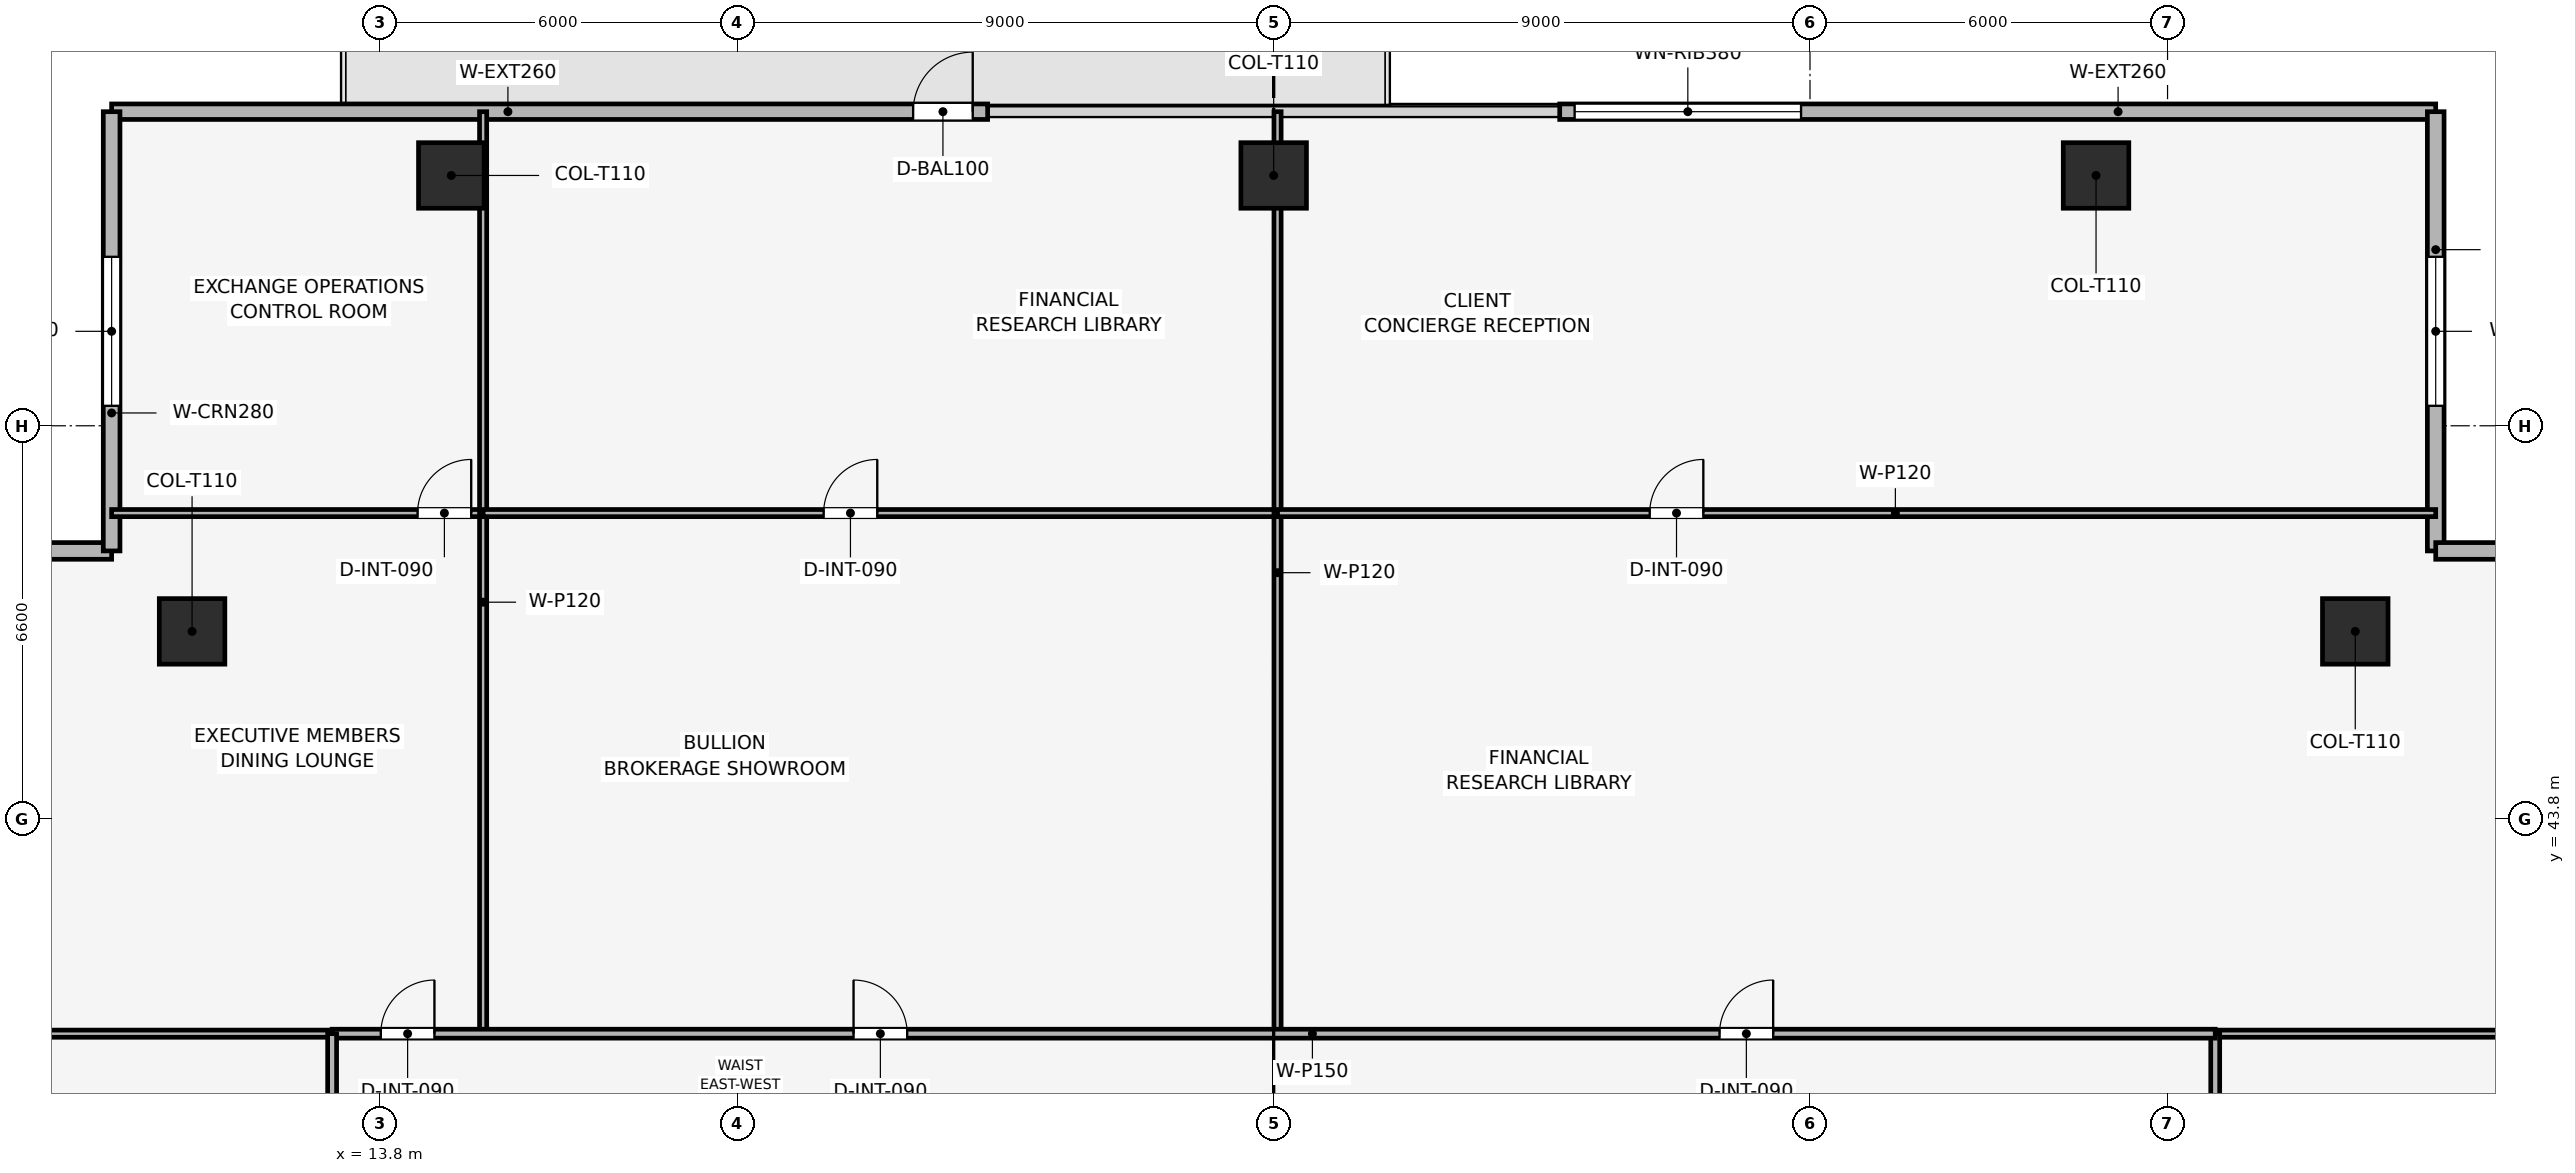
"""IFC4 building model, lengths in metres.
Left out: names, types, materials, properties, quantities, classifications, styles, units other than length and angle.
Written with IfcOpenShell. Run it as: python <this file> out.ifc"""

import sys

from ifc_helpers import new_model, si_unit, direction, frame, frame_2d, origin, origin_2d, place, context, subcontext, project, spatial, rectangle, extrude, element, fill, save


model = new_model("IFC4")
c1 = context("Model", 3, precision=1e-05, world=origin(), true_north=direction((0.0, 1.0)))
c2 = subcontext(c1, "Body", "Model", "MODEL_VIEW")
j1 = project(units=[si_unit("LENGTHUNIT", "METRE"), si_unit("PLANEANGLEUNIT", "RADIAN")], contexts=[c1])
p1 = place(None, origin())
s1 = spatial("IfcSite", under=j1, at=p1, CompositionType="ELEMENT")
p2 = place(p1, origin())
s2 = spatial("IfcBuilding", under=s1, at=p2, CompositionType="ELEMENT")
p3 = place(p2, frame((0.0, 0.0, 226.2)))
s3 = spatial("IfcBuildingStorey", under=s2, at=p3, CompositionType="ELEMENT", Elevation=226.2)
for number, where, z_axis, x_axis in (
    (1, (42.6, 54.6, 0.003), (0.0, 0.0, 1.0), (1.0, 0.0, 0.0)),
    (2, (28.8, 54.6, 0.003), (0.0, 0.0, 1.0), (1.0, 0.0, 0.0)),
    (3, (15.0, 54.6, 0.003), (0.0, 0.0, 1.0), (1.0, 0.0, 0.0)),
    (4, (46.95, 46.95, 0.003), (0.0, 0.0, 1.0), (1.0, 0.0, 0.0)),
    (5, (10.65, 46.95, 0.003), (0.0, 0.0, 1.0), (1.0, 0.0, 0.0)),
):
    element("IfcColumn", number, at=place(p3, frame(where, z_axis=z_axis, x_axis=x_axis)), inside=s3, PredefinedType="COLUMN", context=c2, shape_type="SweptSolid", body=[
        extrude(rectangle(XDim=1.1, YDim=1.1, at=origin_2d()), origin(), (0.0, 0.0, 1.0), 3.494),
    ])
p4 = place(p3, frame((9.3, 55.67, 0.0), z_axis=(0.0, 0.0, 1.0), x_axis=(1.0, 0.0, 0.0)))
e6 = element("IfcWall", 6, at=p4, inside=s3, PredefinedType="SOLIDWALL", context=c2, shape_type="SweptSolid", body=[
    extrude(rectangle(XDim=14.7, YDim=0.26, at=frame_2d((7.35, 0.0))), origin(), (0.0, 0.0, 1.0), 3.5),
])
p5 = place(p4, frame((13.45, 0.0, 0.0)))
e7 = element("IfcOpeningElement", 7, at=p5, cuts=e6, PredefinedType="OPENING", context=c2, shape_type="SweptSolid", body=[
    extrude(rectangle(XDim=1.0, YDim=2.2, at=frame_2d((0.5, 1.1))), frame((0.0, 0.14, 0.0), z_axis=(0.0, -1.0, 0.0), x_axis=(1.0, 0.0, 0.0)), (0.0, 0.0, 1.0), 0.28),
])
p6 = place(p3, frame((33.6, 55.67, 0.0), z_axis=(0.0, 0.0, 1.0), x_axis=(1.0, 0.0, 0.0)))
e8 = element("IfcWall", 8, at=p6, inside=s3, PredefinedType="SOLIDWALL", context=c2, shape_type="SweptSolid", body=[
    extrude(rectangle(XDim=14.7, YDim=0.26, at=frame_2d((7.35, 0.0))), origin(), (0.0, 0.0, 1.0), 3.5),
])
p7 = place(p6, frame((0.25, 0.0, 0.9)))
e9 = element("IfcOpeningElement", 9, at=p7, cuts=e8, PredefinedType="OPENING", context=c2, shape_type="SweptSolid", body=[
    extrude(rectangle(XDim=3.8, YDim=1.9, at=frame_2d((1.9, 0.95))), frame((0.0, 0.14, 0.0), z_axis=(0.0, -1.0, 0.0), x_axis=(1.0, 0.0, 0.0)), (0.0, 0.0, 1.0), 0.28),
])
p8 = place(p3, frame((1.93, 48.3, 0.0), z_axis=(0.0, 0.0, 1.0), x_axis=(1.0, 0.0, 0.0)))
e10 = element("IfcWall", 10, at=p8, inside=s3, PredefinedType="SOLIDWALL", context=c2, shape_type="SweptSolid", body=[
    extrude(rectangle(XDim=7.37, YDim=0.28, at=frame_2d((3.685, 0.0))), origin(), (0.0, 0.0, 1.0), 3.5),
])
p9 = place(p8, frame((2.435, 0.0, 0.9)))
e11 = element("IfcOpeningElement", 11, at=p9, cuts=e10, PredefinedType="OPENING", context=c2, shape_type="SweptSolid", body=[
    extrude(rectangle(XDim=2.5, YDim=1.9, at=frame_2d((1.25, 0.95))), frame((0.0, 0.15, 0.0), z_axis=(0.0, -1.0, 0.0), x_axis=(1.0, 0.0, 0.0)), (0.0, 0.0, 1.0), 0.3),
])
p10 = place(p3, frame((9.3, 48.3, 0.0), z_axis=(0.0, 0.0, 1.0), x_axis=(0.0, 1.0, 0.0)))
e12 = element("IfcWall", 12, at=p10, inside=s3, PredefinedType="SOLIDWALL", context=c2, shape_type="SweptSolid", body=[
    extrude(rectangle(XDim=7.37, YDim=0.28, at=frame_2d((3.685, 0.0))), origin(), (0.0, 0.0, 1.0), 3.5),
])
p11 = place(p10, frame((2.435, 0.0, 0.9)))
e13 = element("IfcOpeningElement", 13, at=p11, cuts=e12, PredefinedType="OPENING", context=c2, shape_type="SweptSolid", body=[
    extrude(rectangle(XDim=2.5, YDim=1.9, at=frame_2d((1.25, 0.95))), frame((0.0, 0.15, 0.0), z_axis=(0.0, -1.0, 0.0), x_axis=(1.0, 0.0, 0.0)), (0.0, 0.0, 1.0), 0.3),
])
p12 = place(p3, frame((48.3, 55.67, 0.0), z_axis=(0.0, 0.0, 1.0), x_axis=(0.0, -1.0, 0.0)))
e14 = element("IfcWall", 14, at=p12, inside=s3, PredefinedType="SOLIDWALL", context=c2, shape_type="SweptSolid", body=[
    extrude(rectangle(XDim=7.37, YDim=0.28, at=frame_2d((3.685, 0.0))), origin(), (0.0, 0.0, 1.0), 3.5),
])
p13 = place(p12, frame((2.435, 0.0, 0.9)))
e15 = element("IfcOpeningElement", 15, at=p13, cuts=e14, PredefinedType="OPENING", context=c2, shape_type="SweptSolid", body=[
    extrude(rectangle(XDim=2.5, YDim=1.9, at=frame_2d((1.25, 0.95))), frame((0.0, 0.15, 0.0), z_axis=(0.0, -1.0, 0.0), x_axis=(1.0, 0.0, 0.0)), (0.0, 0.0, 1.0), 0.3),
])
p14 = place(p3, frame((48.3, 48.3, 0.0), z_axis=(0.0, 0.0, 1.0), x_axis=(1.0, 0.0, 0.0)))
e16 = element("IfcWall", 16, at=p14, inside=s3, PredefinedType="SOLIDWALL", context=c2, shape_type="SweptSolid", body=[
    extrude(rectangle(XDim=7.37, YDim=0.28, at=frame_2d((3.685, 0.0))), origin(), (0.0, 0.0, 1.0), 3.5),
])
p15 = place(p14, frame((2.435, 0.0, 0.9)))
e17 = element("IfcOpeningElement", 17, at=p15, cuts=e16, PredefinedType="OPENING", context=c2, shape_type="SweptSolid", body=[
    extrude(rectangle(XDim=2.5, YDim=1.9, at=frame_2d((1.25, 0.95))), frame((0.0, 0.15, 0.0), z_axis=(0.0, -1.0, 0.0), x_axis=(1.0, 0.0, 0.0)), (0.0, 0.0, 1.0), 0.3),
])
p16 = place(p3, frame((9.3, 48.935, 0.0), z_axis=(0.0, 0.0, 1.0), x_axis=(1.0, 0.0, 0.0)))
e18 = element("IfcWall", 18, at=p16, inside=s3, PredefinedType="PARTITIONING", context=c2, shape_type="SweptSolid", body=[
    extrude(rectangle(XDim=6.234, YDim=0.12, at=frame_2d((3.117, 0.0))), origin(), (0.0, 0.0, 1.0), 2.885),
])
p17 = place(p16, frame((5.134, 0.0, 0.0)))
e19 = element("IfcOpeningElement", 19, at=p17, cuts=e18, PredefinedType="OPENING", context=c2, shape_type="SweptSolid", body=[
    extrude(rectangle(XDim=0.9, YDim=2.1, at=frame_2d((0.45, 1.05))), frame((0.0, 0.07, 0.0), z_axis=(0.0, -1.0, 0.0), x_axis=(1.0, 0.0, 0.0)), (0.0, 0.0, 1.0), 0.14),
])
p18 = place(p3, frame((15.534, 40.2, 0.0), z_axis=(0.0, 0.0, 1.0), x_axis=(0.0, 1.0, 0.0)))
e20 = element("IfcWall", 20, at=p18, inside=s3, PredefinedType="PARTITIONING", context=c2, shape_type="SweptSolid", body=[
    extrude(rectangle(XDim=15.47, YDim=0.12, at=frame_2d((7.735, 0.0))), origin(), (0.0, 0.0, 1.0), 2.885),
])
p19 = place(p3, frame((15.534, 48.935, 0.0), z_axis=(0.0, 0.0, 1.0), x_axis=(1.0, 0.0, 0.0)))
e21 = element("IfcWall", 21, at=p19, inside=s3, PredefinedType="PARTITIONING", context=c2, shape_type="SweptSolid", body=[
    extrude(rectangle(XDim=13.331, YDim=0.12, at=frame_2d((6.666, 0.0))), origin(), (0.0, 0.0, 1.0), 3.035),
])
p20 = place(p19, frame((5.714, 0.0, 0.0)))
e22 = element("IfcOpeningElement", 22, at=p20, cuts=e21, PredefinedType="OPENING", context=c2, shape_type="SweptSolid", body=[
    extrude(rectangle(XDim=0.9, YDim=2.1, at=frame_2d((0.45, 1.05))), frame((0.0, 0.07, 0.0), z_axis=(0.0, -1.0, 0.0), x_axis=(1.0, 0.0, 0.0)), (0.0, 0.0, 1.0), 0.14),
])
p21 = place(p3, frame((28.865, 40.2, 0.0), z_axis=(0.0, 0.0, 1.0), x_axis=(0.0, 1.0, 0.0)))
e23 = element("IfcWall", 23, at=p21, inside=s3, PredefinedType="PARTITIONING", context=c2, shape_type="SweptSolid", body=[
    extrude(rectangle(XDim=15.47, YDim=0.12, at=frame_2d((7.735, 0.0))), origin(), (0.0, 0.0, 1.0), 2.985),
])
p22 = place(p3, frame((28.865, 48.935, 0.0), z_axis=(0.0, 0.0, 1.0), x_axis=(1.0, 0.0, 0.0)))
e24 = element("IfcWall", 24, at=p22, inside=s3, PredefinedType="PARTITIONING", context=c2, shape_type="SweptSolid", body=[
    extrude(rectangle(XDim=19.435, YDim=0.12, at=frame_2d((9.718, 0.0))), origin(), (0.0, 0.0, 1.0), 2.885),
])
p23 = place(p22, frame((6.245, 0.0, 0.0)))
e25 = element("IfcOpeningElement", 25, at=p23, cuts=e24, PredefinedType="OPENING", context=c2, shape_type="SweptSolid", body=[
    extrude(rectangle(XDim=0.9, YDim=2.1, at=frame_2d((0.45, 1.05))), frame((0.0, 0.07, 0.0), z_axis=(0.0, -1.0, 0.0), x_axis=(1.0, 0.0, 0.0)), (0.0, 0.0, 1.0), 0.14),
])
p24 = place(p3, frame((1.93, 40.2, 0.0), z_axis=(0.0, 0.0, 1.0), x_axis=(1.0, 0.0, 0.0)))
e26 = element("IfcWall", 26, at=p24, inside=s3, PredefinedType="PARTITIONING", context=c2, shape_type="SweptSolid", body=[
    extrude(rectangle(XDim=11.07, YDim=0.12, at=frame_2d((5.535, 0.0))), origin(), (0.0, 0.0, 1.0), 2.885),
])
p25 = place(p3, frame((44.6, 40.2, 0.0), z_axis=(0.0, 0.0, 1.0), x_axis=(1.0, 0.0, 0.0)))
e27 = element("IfcWall", 27, at=p25, inside=s3, PredefinedType="PARTITIONING", context=c2, shape_type="SweptSolid", body=[
    extrude(rectangle(XDim=11.07, YDim=0.12, at=frame_2d((5.535, 0.0))), origin(), (0.0, 0.0, 1.0), 2.885),
])
p26 = place(p3, frame((44.6, 37.8, 0.0), z_axis=(0.0, 0.0, 1.0), x_axis=(0.0, 1.0, 0.0)))
e28 = element("IfcWall", 28, at=p26, inside=s3, PredefinedType="PARTITIONING", context=c2, shape_type="SweptSolid", body=[
    extrude(rectangle(XDim=2.4, YDim=0.15, at=frame_2d((1.2, 0.0))), origin(), (0.0, 0.0, 1.0), 3.5),
])
p27 = place(p3, frame((13.0, 40.2, 0.0), z_axis=(0.0, 0.0, 1.0), x_axis=(1.0, 0.0, 0.0)))
e29 = element("IfcWall", 29, at=p27, inside=s3, PredefinedType="PARTITIONING", context=c2, shape_type="SweptSolid", body=[
    extrude(rectangle(XDim=31.6, YDim=0.15, at=frame_2d((15.8, 0.0))), origin(), (0.0, 0.0, 1.0), 3.035),
])
p28 = place(p27, frame((0.817, 0.0, 0.0)))
e30 = element("IfcOpeningElement", 30, at=p28, cuts=e29, PredefinedType="OPENING", context=c2, shape_type="SweptSolid", body=[
    extrude(rectangle(XDim=0.9, YDim=2.1, at=frame_2d((0.45, 1.05))), frame((0.0, 0.085, 0.0), z_axis=(0.0, -1.0, 0.0), x_axis=(1.0, 0.0, 0.0)), (0.0, 0.0, 1.0), 0.17),
])
p29 = place(p27, frame((8.75, 0.0, 0.0)))
e31 = element("IfcOpeningElement", 31, at=p29, cuts=e29, PredefinedType="OPENING", context=c2, shape_type="SweptSolid", body=[
    extrude(rectangle(XDim=0.9, YDim=2.1, at=frame_2d((0.45, 1.05))), frame((0.0, 0.085, 0.0), z_axis=(0.0, -1.0, 0.0), x_axis=(1.0, 0.0, 0.0)), (0.0, 0.0, 1.0), 0.17),
])
p30 = place(p27, frame((23.282, 0.0, 0.0)))
e32 = element("IfcOpeningElement", 32, at=p30, cuts=e29, PredefinedType="OPENING", context=c2, shape_type="SweptSolid", body=[
    extrude(rectangle(XDim=0.9, YDim=2.1, at=frame_2d((0.45, 1.05))), frame((0.0, 0.085, 0.0), z_axis=(0.0, -1.0, 0.0), x_axis=(1.0, 0.0, 0.0)), (0.0, 0.0, 1.0), 0.17),
])
p31 = place(p3, frame((13.0, 17.4, 0.0), z_axis=(0.0, 0.0, 1.0), x_axis=(0.0, 1.0, 0.0)))
e33 = element("IfcWall", 33, at=p31, inside=s3, PredefinedType="PARTITIONING", context=c2, shape_type="SweptSolid", body=[
    extrude(rectangle(XDim=22.8, YDim=0.15, at=frame_2d((11.4, 0.0))), origin(), (0.0, 0.0, 1.0), 3.035),
])
p32 = place(p31, frame((10.95, 0.0, 0.0)))
e34 = element("IfcOpeningElement", 34, at=p32, cuts=e33, PredefinedType="OPENING", context=c2, shape_type="SweptSolid", body=[
    extrude(rectangle(XDim=0.9, YDim=2.1, at=frame_2d((0.45, 1.05))), frame((0.0, 0.085, 0.0), z_axis=(0.0, -1.0, 0.0), x_axis=(1.0, 0.0, 0.0)), (0.0, 0.0, 1.0), 0.17),
])
p33 = place(p5, origin())
e35 = element("IfcDoor", 35, at=p33, inside=s3, OperationType="SINGLE_SWING_RIGHT", PredefinedType="DOOR", context=c2, shape_type="SweptSolid", body=[
    extrude(rectangle(XDim=1.0, YDim=2.2, at=frame_2d((0.5, 1.1))), frame((0.0, 0.025, 0.0), z_axis=(0.0, -1.0, 0.0), x_axis=(1.0, 0.0, 0.0)), (0.0, 0.0, 1.0), 0.05),
])
fill(e7, e35)
p34 = place(p7, origin())
e36 = element("IfcWindow", 36, at=p34, inside=s3, PartitioningType="SINGLE_PANEL", PredefinedType="WINDOW", context=c2, shape_type="SweptSolid", body=[
    extrude(rectangle(XDim=3.8, YDim=1.9, at=frame_2d((1.9, 0.95))), frame((0.0, 0.03, 0.0), z_axis=(0.0, -1.0, 0.0), x_axis=(1.0, 0.0, 0.0)), (0.0, 0.0, 1.0), 0.06),
])
fill(e9, e36)
p35 = place(p11, origin())
e37 = element("IfcWindow", 37, at=p35, inside=s3, PartitioningType="SINGLE_PANEL", PredefinedType="WINDOW", context=c2, shape_type="SweptSolid", body=[
    extrude(rectangle(XDim=2.5, YDim=1.9, at=frame_2d((1.25, 0.95))), frame((0.0, 0.03, 0.0), z_axis=(0.0, -1.0, 0.0), x_axis=(1.0, 0.0, 0.0)), (0.0, 0.0, 1.0), 0.06),
])
fill(e13, e37)
p36 = place(p13, origin())
e38 = element("IfcWindow", 38, at=p36, inside=s3, PartitioningType="SINGLE_PANEL", PredefinedType="WINDOW", context=c2, shape_type="SweptSolid", body=[
    extrude(rectangle(XDim=2.5, YDim=1.9, at=frame_2d((1.25, 0.95))), frame((0.0, 0.03, 0.0), z_axis=(0.0, -1.0, 0.0), x_axis=(1.0, 0.0, 0.0)), (0.0, 0.0, 1.0), 0.06),
])
fill(e15, e38)
p37 = place(p17, origin())
e39 = element("IfcDoor", 39, at=p37, inside=s3, OperationType="SINGLE_SWING_RIGHT", PredefinedType="DOOR", context=c2, shape_type="SweptSolid", body=[
    extrude(rectangle(XDim=0.9, YDim=2.1, at=frame_2d((0.45, 1.05))), frame((0.0, 0.025, 0.0), z_axis=(0.0, -1.0, 0.0), x_axis=(1.0, 0.0, 0.0)), (0.0, 0.0, 1.0), 0.05),
])
fill(e19, e39)
p38 = place(p20, origin())
e40 = element("IfcDoor", 40, at=p38, inside=s3, OperationType="SINGLE_SWING_RIGHT", PredefinedType="DOOR", context=c2, shape_type="SweptSolid", body=[
    extrude(rectangle(XDim=0.9, YDim=2.1, at=frame_2d((0.45, 1.05))), frame((0.0, 0.025, 0.0), z_axis=(0.0, -1.0, 0.0), x_axis=(1.0, 0.0, 0.0)), (0.0, 0.0, 1.0), 0.05),
])
fill(e22, e40)
p39 = place(p23, origin())
e41 = element("IfcDoor", 41, at=p39, inside=s3, OperationType="SINGLE_SWING_RIGHT", PredefinedType="DOOR", context=c2, shape_type="SweptSolid", body=[
    extrude(rectangle(XDim=0.9, YDim=2.1, at=frame_2d((0.45, 1.05))), frame((0.0, 0.025, 0.0), z_axis=(0.0, -1.0, 0.0), x_axis=(1.0, 0.0, 0.0)), (0.0, 0.0, 1.0), 0.05),
])
fill(e25, e41)
p40 = place(p28, origin())
e42 = element("IfcDoor", 42, at=p40, inside=s3, OperationType="SINGLE_SWING_RIGHT", PredefinedType="DOOR", context=c2, shape_type="SweptSolid", body=[
    extrude(rectangle(XDim=0.9, YDim=2.1, at=frame_2d((0.45, 1.05))), frame((0.0, 0.025, 0.0), z_axis=(0.0, -1.0, 0.0), x_axis=(1.0, 0.0, 0.0)), (0.0, 0.0, 1.0), 0.05),
])
fill(e30, e42)
p41 = place(p29, origin())
e43 = element("IfcDoor", 43, at=p41, inside=s3, OperationType="SINGLE_SWING_LEFT", PredefinedType="DOOR", context=c2, shape_type="SweptSolid", body=[
    extrude(rectangle(XDim=0.9, YDim=2.1, at=frame_2d((0.45, 1.05))), frame((0.0, 0.025, 0.0), z_axis=(0.0, -1.0, 0.0), x_axis=(1.0, 0.0, 0.0)), (0.0, 0.0, 1.0), 0.05),
])
fill(e31, e43)
p42 = place(p30, origin())
e44 = element("IfcDoor", 44, at=p42, inside=s3, OperationType="SINGLE_SWING_RIGHT", PredefinedType="DOOR", context=c2, shape_type="SweptSolid", body=[
    extrude(rectangle(XDim=0.9, YDim=2.1, at=frame_2d((0.45, 1.05))), frame((0.0, 0.025, 0.0), z_axis=(0.0, -1.0, 0.0), x_axis=(1.0, 0.0, 0.0)), (0.0, 0.0, 1.0), 0.05),
])
fill(e32, e44)
save(model, sys.argv[1])
